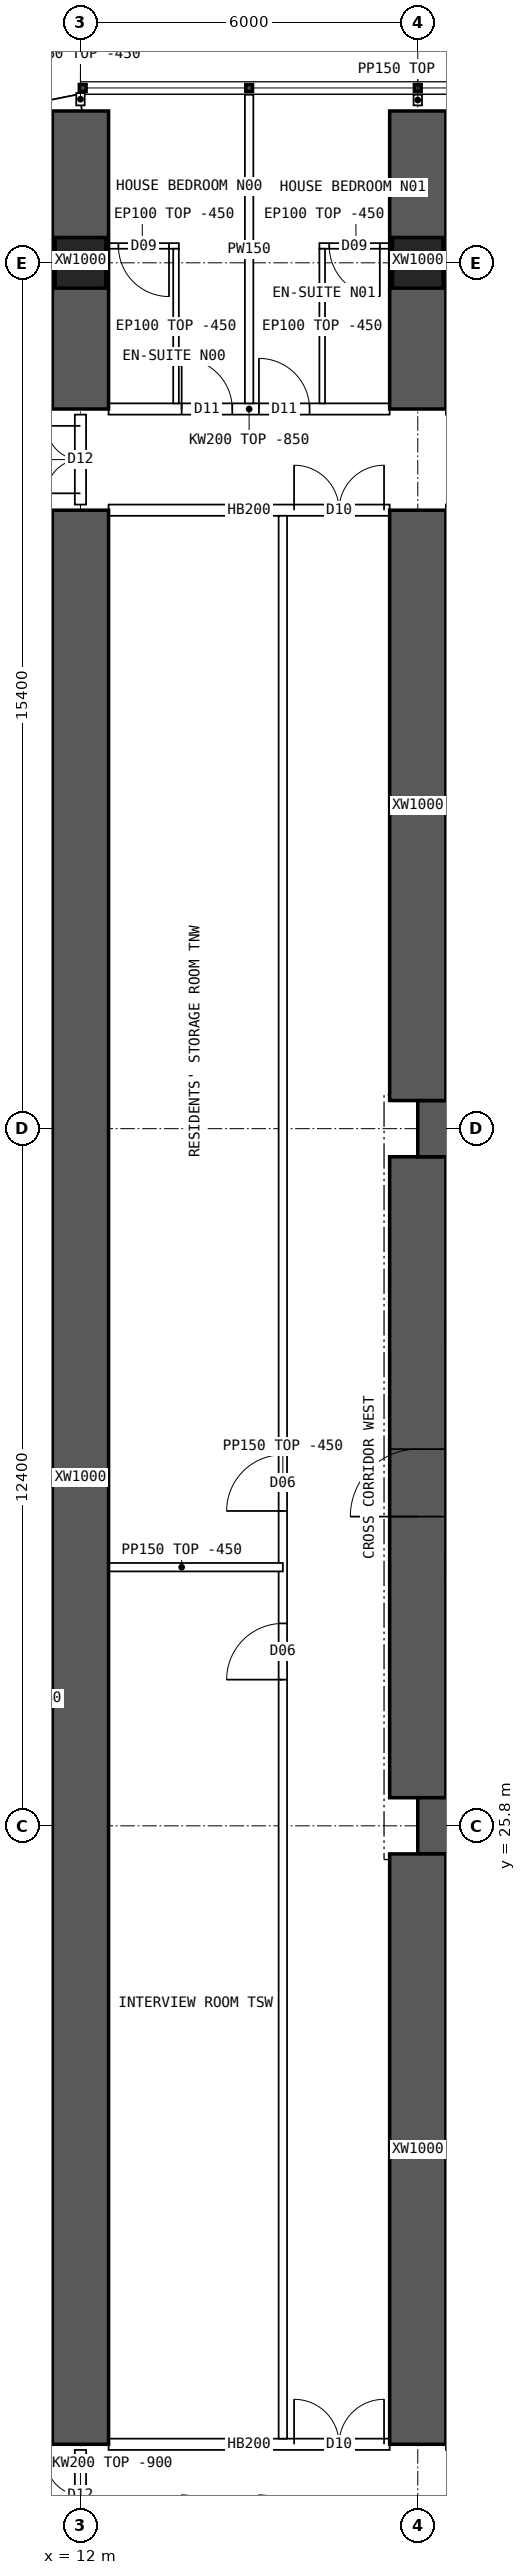
"""IFC4 building model, lengths in metres.
Left out: names, types, materials, properties, quantities, classifications, styles, units other than length and angle.
Written with IfcOpenShell. Run it as: python <this file> out.ifc"""

import sys

from ifc_helpers import new_model, si_unit, direction, frame, frame_2d, origin, origin_2d, place, context, subcontext, project, spatial, polyline, rectangle, hollow_rectangle, outline, extrude, element, fill, save


model = new_model("IFC4")
c1 = context("Model", 3, precision=1e-05, world=origin(), true_north=direction((0.0, 1.0)))
c2 = subcontext(c1, "Body", "Model", "MODEL_VIEW")
j1 = project(units=[si_unit("LENGTHUNIT", "METRE"), si_unit("PLANEANGLEUNIT", "RADIAN")], contexts=[c1])
p1 = place(None, origin())
s1 = spatial("IfcSite", under=j1, at=p1, CompositionType="ELEMENT")
p2 = place(p1, origin())
s2 = spatial("IfcBuilding", under=s1, at=p2, CompositionType="ELEMENT")
p3 = place(p2, frame((0.0, 0.0, 50.2)))
s3 = spatial("IfcBuildingStorey", under=s2, at=p3, CompositionType="ELEMENT", Elevation=50.2)
for number, where, z_axis, x_axis in (
    (1, (12.0, 53.6, 0.0), (0.0, 0.0, 1.0), (1.0, 0.0, 0.0)),
    (2, (18.0, 53.6, 0.0), (0.0, 0.0, 1.0), (1.0, 0.0, 0.0)),
):
    element("IfcColumn", number, at=place(p3, frame(where, z_axis=z_axis, x_axis=x_axis)), inside=s3, PredefinedType="COLUMN", context=c2, shape_type="SweptSolid", body=[
        extrude(hollow_rectangle(XDim=0.9, YDim=0.9, WallThickness=0.09, at=origin_2d()), origin(), (0.0, 0.0, 1.0), 3.75),
    ])
for number, where, z_axis, x_axis in (
    (3, (18.0, 25.8, 0.0), (0.0, 0.0, 1.0), (1.0, 0.0, 0.0)),
    (4, (18.0, 38.2, 0.0), (0.0, 0.0, 1.0), (1.0, 0.0, 0.0)),
):
    element("IfcWall", number, at=place(p3, frame(where, z_axis=z_axis, x_axis=x_axis)), inside=s3, PredefinedType="SHEAR", context=c2, shape_type="SweptSolid", body=[
        extrude(rectangle(XDim=48.0, YDim=1.0, at=frame_2d((24.0, 0.0))), origin(), (0.0, 0.0, 1.0), 3.75),
    ])
p4 = place(p3, frame((18.0, 26.3, 0.0), z_axis=(0.0, 0.0, 1.0), x_axis=(0.0, 1.0, 0.0)))
e5 = element("IfcWall", 5, at=p4, inside=s3, PredefinedType="SHEAR", context=c2, shape_type="SweptSolid", body=[
    extrude(rectangle(XDim=11.4, YDim=1.0, at=frame_2d((5.7, 0.0))), origin(), (0.0, 0.0, 1.0), 3.75),
])
p5 = place(p4, frame((5.0, 0.0, 0.0)))
e6 = element("IfcOpeningElement", 6, at=p5, cuts=e5, PredefinedType="OPENING", context=c2, shape_type="SweptSolid", body=[
    extrude(rectangle(XDim=1.2, YDim=2.1, at=frame_2d((0.6, 1.05))), frame((0.0, 0.51, 0.0), z_axis=(0.0, -1.0, 0.0), x_axis=(1.0, 0.0, 0.0)), (0.0, 0.0, 1.0), 1.02),
])
p6 = place(p3, frame((12.0, 51.0, 0.0), z_axis=(0.0, 0.0, 1.0), x_axis=(0.0, 1.0, 0.0)))
e7 = element("IfcWall", 7, at=p6, inside=s3, PredefinedType="SHEAR", context=c2, shape_type="SweptSolid", body=[
    extrude(rectangle(XDim=5.3, YDim=1.0, at=frame_2d((2.65, 0.0))), origin(), (0.0, 0.0, 1.0), 3.75),
])
p7 = place(p3, frame((12.0, 14.8, 0.0), z_axis=(0.0, 0.0, 1.0), x_axis=(0.0, 1.0, 0.0)))
e8 = element("IfcWall", 8, at=p7, inside=s3, PredefinedType="SHEAR", context=c2, shape_type="SweptSolid", body=[
    extrude(rectangle(XDim=34.4, YDim=1.0, at=frame_2d((17.2, 0.0))), origin(), (0.0, 0.0, 1.0), 3.75),
])
p8 = place(p3, frame((18.0, 51.0, 0.0), z_axis=(0.0, 0.0, 1.0), x_axis=(0.0, 1.0, 0.0)))
e9 = element("IfcWall", 9, at=p8, inside=s3, PredefinedType="SHEAR", context=c2, shape_type="SweptSolid", body=[
    extrude(rectangle(XDim=5.3, YDim=1.0, at=frame_2d((2.65, 0.0))), origin(), (0.0, 0.0, 1.0), 3.75),
])
for number, where, z_axis, x_axis in (
    (10, (18.0, 14.8, 0.0), (0.0, 0.0, 1.0), (0.0, 1.0, 0.0)),
    (11, (18.0, 38.7, 0.0), (0.0, 0.0, 1.0), (0.0, 1.0, 0.0)),
):
    element("IfcWall", number, at=place(p3, frame(where, z_axis=z_axis, x_axis=x_axis)), inside=s3, PredefinedType="SHEAR", context=c2, shape_type="SweptSolid", body=[
        extrude(rectangle(XDim=10.5, YDim=1.0, at=frame_2d((5.25, 0.0))), origin(), (0.0, 0.0, 1.0), 3.75),
    ])
p9 = place(p3, frame((12.0, 56.45, 0.0), z_axis=(0.0, 0.0, 1.0), x_axis=(-0.980787251524, -0.195080412259, 0.0)))
e12 = element("IfcWall", 12, at=p9, inside=s3, PredefinedType="SOLIDWALL", context=c2, shape_type="SweptSolid", body=[
    extrude(outline(polyline([(-0.03, -0.15), (3.249, -0.15), (3.189, 0.15), (0.03, 0.15), (-0.03, -0.15)])), origin(), (0.0, 0.0, 1.0), 3.3),
])
p10 = place(p9, frame((0.909, 0.0, 0.9)))
e13 = element("IfcOpeningElement", 13, at=p10, cuts=e12, PredefinedType="OPENING", context=c2, shape_type="SweptSolid", body=[
    extrude(rectangle(XDim=1.4, YDim=1.8, at=frame_2d((0.7, 0.9))), frame((0.0, 0.16, 0.0), z_axis=(0.0, -1.0, 0.0), x_axis=(1.0, 0.0, 0.0)), (0.0, 0.0, 1.0), 0.32),
])
p11 = place(p3, frame((12.5, 14.8, 0.0), z_axis=(0.0, 0.0, 1.0), x_axis=(1.0, 0.0, 0.0)))
e14 = element("IfcWall", 14, at=p11, inside=s3, PredefinedType="SOLIDWALL", context=c2, shape_type="SweptSolid", body=[
    extrude(rectangle(XDim=5.0, YDim=0.2, at=frame_2d((2.5, 0.0))), origin(), (0.0, 0.0, 1.0), 3.3),
])
p12 = place(p11, frame((3.3, 0.0, 0.0)))
e15 = element("IfcOpeningElement", 15, at=p12, cuts=e14, PredefinedType="OPENING", context=c2, shape_type="SweptSolid", body=[
    extrude(rectangle(XDim=1.6, YDim=2.1, at=frame_2d((0.8, 1.05))), frame((0.0, 0.11, 0.0), z_axis=(0.0, -1.0, 0.0), x_axis=(1.0, 0.0, 0.0)), (0.0, 0.0, 1.0), 0.22),
])
p13 = place(p3, frame((12.5, 51.0, 0.0), z_axis=(0.0, 0.0, 1.0), x_axis=(1.0, 0.0, 0.0)))
e16 = element("IfcWall", 16, at=p13, inside=s3, PredefinedType="SOLIDWALL", context=c2, shape_type="SweptSolid", body=[
    extrude(outline(polyline([(0.0, 0.0), (5.0, 0.0), (5.0, 2.9), (0.0, 2.9), (0.0, 0.0)])), frame((0.0, 0.1, 0.0), z_axis=(0.0, -1.0, 0.0), x_axis=(1.0, 0.0, 0.0)), (0.0, 0.0, 1.0), 0.2),
])
p14 = place(p13, frame((1.3, 0.0, 0.0)))
e17 = element("IfcOpeningElement", 17, at=p14, cuts=e16, PredefinedType="OPENING", context=c2, shape_type="SweptSolid", body=[
    extrude(rectangle(XDim=0.9, YDim=2.1, at=frame_2d((0.45, 1.05))), frame((0.0, 0.11, 0.0), z_axis=(0.0, -1.0, 0.0), x_axis=(1.0, 0.0, 0.0)), (0.0, 0.0, 1.0), 0.22),
])
p15 = place(p13, frame((2.675, 0.0, 0.0)))
e18 = element("IfcOpeningElement", 18, at=p15, cuts=e16, PredefinedType="OPENING", context=c2, shape_type="SweptSolid", body=[
    extrude(rectangle(XDim=0.9, YDim=2.1, at=frame_2d((0.45, 1.05))), frame((0.0, 0.11, 0.0), z_axis=(0.0, -1.0, 0.0), x_axis=(1.0, 0.0, 0.0)), (0.0, 0.0, 1.0), 0.22),
])
p16 = place(p3, frame((12.5, 49.2, 0.0), z_axis=(0.0, 0.0, 1.0), x_axis=(1.0, 0.0, 0.0)))
e19 = element("IfcWall", 19, at=p16, inside=s3, PredefinedType="SOLIDWALL", context=c2, shape_type="SweptSolid", body=[
    extrude(rectangle(XDim=5.0, YDim=0.2, at=frame_2d((2.5, 0.0))), origin(), (0.0, 0.0, 1.0), 3.3),
])
p17 = place(p16, frame((3.3, 0.0, 0.0)))
e20 = element("IfcOpeningElement", 20, at=p17, cuts=e19, PredefinedType="OPENING", context=c2, shape_type="SweptSolid", body=[
    extrude(rectangle(XDim=1.6, YDim=2.1, at=frame_2d((0.8, 1.05))), frame((0.0, 0.11, 0.0), z_axis=(0.0, -1.0, 0.0), x_axis=(1.0, 0.0, 0.0)), (0.0, 0.0, 1.0), 0.22),
])
p18 = place(p3, frame((15.0, 56.59, 0.0), z_axis=(0.0, 0.0, 1.0), x_axis=(0.0, -1.0, 0.0)))
e21 = element("IfcWall", 21, at=p18, inside=s3, PredefinedType="PARTITIONING", context=c2, shape_type="SweptSolid", body=[
    extrude(outline(polyline([(0.0, 0.0), (5.49, 0.0), (5.49, 2.9), (5.442, 2.9), (5.44, 3.3), (3.192, 3.3), (3.19, 2.9), (2.792, 2.9), (2.79, 3.3), (0.0, 3.3), (0.0, 0.0)])), frame((0.0, 0.075, 0.0), z_axis=(0.0, -1.0, 0.0), x_axis=(1.0, 0.0, 0.0)), (0.0, 0.0, 1.0), 0.15),
])
p19 = place(p3, frame((12.45, 53.9, 0.0), z_axis=(0.0, 0.0, 1.0), x_axis=(1.0, 0.0, 0.0)))
e22 = element("IfcWall", 22, at=p19, inside=s3, PredefinedType="PARTITIONING", context=c2, shape_type="SweptSolid", body=[
    extrude(rectangle(XDim=1.3, YDim=0.1, at=frame_2d((0.65, 0.0))), origin(), (0.0, 0.0, 1.0), 3.3),
])
p20 = place(p19, frame((0.225, 0.0, 0.0)))
e23 = element("IfcOpeningElement", 23, at=p20, cuts=e22, PredefinedType="OPENING", context=c2, shape_type="SweptSolid", body=[
    extrude(rectangle(XDim=0.9, YDim=2.1, at=frame_2d((0.45, 1.05))), frame((0.0, 0.06, 0.0), z_axis=(0.0, -1.0, 0.0), x_axis=(1.0, 0.0, 0.0)), (0.0, 0.0, 1.0), 0.12),
])
p21 = place(p3, frame((13.7, 53.85, 0.0), z_axis=(0.0, 0.0, 1.0), x_axis=(0.0, -1.0, 0.0)))
e24 = element("IfcWall", 24, at=p21, inside=s3, PredefinedType="PARTITIONING", context=c2, shape_type="SweptSolid", body=[
    extrude(outline(polyline([(0.0, 0.0), (2.75, 0.0), (2.75, 2.9), (2.702, 2.9), (2.7, 3.3), (0.452, 3.3), (0.45, 2.9), (0.0, 2.9), (0.0, 0.0)])), frame((0.0, 0.05, 0.0), z_axis=(0.0, -1.0, 0.0), x_axis=(1.0, 0.0, 0.0)), (0.0, 0.0, 1.0), 0.1),
])
p22 = place(p3, frame((16.25, 53.9, 0.0), z_axis=(0.0, 0.0, 1.0), x_axis=(1.0, 0.0, 0.0)))
e25 = element("IfcWall", 25, at=p22, inside=s3, PredefinedType="PARTITIONING", context=c2, shape_type="SweptSolid", body=[
    extrude(rectangle(XDim=1.3, YDim=0.1, at=frame_2d((0.65, 0.0))), origin(), (0.0, 0.0, 1.0), 3.3),
])
p23 = place(p22, frame((0.175, 0.0, 0.0)))
e26 = element("IfcOpeningElement", 26, at=p23, cuts=e25, PredefinedType="OPENING", context=c2, shape_type="SweptSolid", body=[
    extrude(rectangle(XDim=0.9, YDim=2.1, at=frame_2d((0.45, 1.05))), frame((0.0, 0.06, 0.0), z_axis=(0.0, -1.0, 0.0), x_axis=(1.0, 0.0, 0.0)), (0.0, 0.0, 1.0), 0.12),
])
p24 = place(p3, frame((16.3, 53.85, 0.0), z_axis=(0.0, 0.0, 1.0), x_axis=(0.0, -1.0, 0.0)))
e27 = element("IfcWall", 27, at=p24, inside=s3, PredefinedType="PARTITIONING", context=c2, shape_type="SweptSolid", body=[
    extrude(outline(polyline([(0.0, 0.0), (2.75, 0.0), (2.75, 2.9), (2.702, 2.9), (2.7, 3.3), (0.452, 3.3), (0.45, 2.9), (0.0, 2.9), (0.0, 0.0)])), frame((0.0, 0.05, 0.0), z_axis=(0.0, -1.0, 0.0), x_axis=(1.0, 0.0, 0.0)), (0.0, 0.0, 1.0), 0.1),
])
p25 = place(p3, frame((15.6, 14.9, 0.0), z_axis=(0.0, 0.0, 1.0), x_axis=(0.0, 1.0, 0.0)))
e28 = element("IfcWall", 28, at=p25, inside=s3, PredefinedType="PARTITIONING", context=c2, shape_type="SweptSolid", body=[
    extrude(rectangle(XDim=34.2, YDim=0.15, at=frame_2d((17.1, 0.0))), origin(), (0.0, 0.0, 1.0), 3.3),
])
p26 = place(p25, frame((13.5, 0.0, 0.0)))
e29 = element("IfcOpeningElement", 29, at=p26, cuts=e28, PredefinedType="OPENING", context=c2, shape_type="SweptSolid", body=[
    extrude(rectangle(XDim=1.0, YDim=2.1, at=frame_2d((0.5, 1.05))), frame((0.0, 0.085, 0.0), z_axis=(0.0, -1.0, 0.0), x_axis=(1.0, 0.0, 0.0)), (0.0, 0.0, 1.0), 0.17),
])
p27 = place(p25, frame((16.5, 0.0, 0.0)))
e30 = element("IfcOpeningElement", 30, at=p27, cuts=e28, PredefinedType="OPENING", context=c2, shape_type="SweptSolid", body=[
    extrude(rectangle(XDim=1.0, YDim=2.1, at=frame_2d((0.5, 1.05))), frame((0.0, 0.085, 0.0), z_axis=(0.0, -1.0, 0.0), x_axis=(1.0, 0.0, 0.0)), (0.0, 0.0, 1.0), 0.17),
])
p28 = place(p3, frame((12.0, 30.4, 0.0), z_axis=(0.0, 0.0, 1.0), x_axis=(1.0, 0.0, 0.0)))
e31 = element("IfcWall", 31, at=p28, inside=s3, PredefinedType="PARTITIONING", context=c2, shape_type="SweptSolid", body=[
    extrude(rectangle(XDim=3.6, YDim=0.15, at=frame_2d((1.8, 0.0))), origin(), (0.0, 0.0, 1.0), 3.3),
])
p29 = place(p3, frame((3.905, 30.85, 0.0), z_axis=(0.0, 0.0, 1.0), x_axis=(1.0, 0.0, 0.0)))
e32 = element("IfcWall", 32, at=p29, inside=s3, PredefinedType="PARTITIONING", context=c2, shape_type="SweptSolid", body=[
    extrude(outline(polyline([(0.0, 0.0), (8.02, 0.0), (8.02, 3.3), (2.397, 3.3), (2.395, 2.85), (1.797, 2.85), (1.795, 3.3), (0.0, 3.3), (0.0, 0.0)])), frame((0.0, 0.075, 0.0), z_axis=(0.0, -1.0, 0.0), x_axis=(1.0, 0.0, 0.0)), (0.0, 0.0, 1.0), 0.15),
])
p30 = place(p3, frame((12.0, 13.1, 0.0), z_axis=(0.0, 0.0, 1.0), x_axis=(0.0, 1.0, 0.0)))
e33 = element("IfcWall", 33, at=p30, inside=s3, PredefinedType="SOLIDWALL", context=c2, shape_type="SweptSolid", body=[
    extrude(outline(polyline([(0.0, 0.0), (1.6, 0.0), (1.6, 2.85), (0.0, 2.85), (0.0, 0.0)])), frame((0.0, 0.1, 0.0), z_axis=(0.0, -1.0, 0.0), x_axis=(1.0, 0.0, 0.0)), (0.0, 0.0, 1.0), 0.2),
])
p31 = place(p30, frame((0.2, 0.0, 0.0)))
e34 = element("IfcOpeningElement", 34, at=p31, cuts=e33, PredefinedType="OPENING", context=c2, shape_type="SweptSolid", body=[
    extrude(rectangle(XDim=1.2, YDim=2.1, at=frame_2d((0.6, 1.05))), frame((0.0, 0.11, 0.0), z_axis=(0.0, -1.0, 0.0), x_axis=(1.0, 0.0, 0.0)), (0.0, 0.0, 1.0), 0.22),
])
p32 = place(p3, frame((12.0, 49.3, 0.0), z_axis=(0.0, 0.0, 1.0), x_axis=(0.0, 1.0, 0.0)))
e35 = element("IfcWall", 35, at=p32, inside=s3, PredefinedType="SOLIDWALL", context=c2, shape_type="SweptSolid", body=[
    extrude(outline(polyline([(0.0, 0.0), (1.6, 0.0), (1.6, 2.85), (0.0, 2.85), (0.0, 0.0)])), frame((0.0, 0.1, 0.0), z_axis=(0.0, -1.0, 0.0), x_axis=(1.0, 0.0, 0.0)), (0.0, 0.0, 1.0), 0.2),
])
p33 = place(p32, frame((0.2, 0.0, 0.0)))
e36 = element("IfcOpeningElement", 36, at=p33, cuts=e35, PredefinedType="OPENING", context=c2, shape_type="SweptSolid", body=[
    extrude(rectangle(XDim=1.2, YDim=2.1, at=frame_2d((0.6, 1.05))), frame((0.0, 0.11, 0.0), z_axis=(0.0, -1.0, 0.0), x_axis=(1.0, 0.0, 0.0)), (0.0, 0.0, 1.0), 0.22),
])
p34 = place(p3, frame((12.0, 56.4, 0.0), z_axis=(0.0, 0.0, 1.0), x_axis=(0.0, 1.0, 0.0)))
e37 = element("IfcWall", 37, at=p34, inside=s3, PredefinedType="PARTITIONING", context=c2, shape_type="SweptSolid", body=[
    extrude(rectangle(XDim=0.22, YDim=0.15, at=frame_2d((0.11, 0.0))), origin(), (0.0, 0.0, 1.0), 3.3),
])
p35 = place(p3, frame((18.0, 56.4, 0.0), z_axis=(0.0, 0.0, 1.0), x_axis=(0.0, 1.0, 0.0)))
e38 = element("IfcWall", 38, at=p35, inside=s3, PredefinedType="PARTITIONING", context=c2, shape_type="SweptSolid", body=[
    extrude(rectangle(XDim=0.19, YDim=0.15, at=frame_2d((0.095, 0.0))), origin(), (0.0, 0.0, 1.0), 3.3),
])
p36 = place(p5, origin())
e39 = element("IfcDoor", 39, at=p36, inside=s3, OperationType="SINGLE_SWING_LEFT", PredefinedType="DOOR", context=c2, shape_type="SweptSolid", body=[
    extrude(rectangle(XDim=1.2, YDim=2.1, at=frame_2d((0.6, 1.05))), frame((0.0, 0.025, 0.0), z_axis=(0.0, -1.0, 0.0), x_axis=(1.0, 0.0, 0.0)), (0.0, 0.0, 1.0), 0.05),
])
fill(e6, e39)
p37 = place(p12, origin())
e40 = element("IfcDoor", 40, at=p37, inside=s3, OperationType="DOUBLE_DOOR_SINGLE_SWING", PredefinedType="DOOR", context=c2, shape_type="SweptSolid", body=[
    extrude(rectangle(XDim=1.6, YDim=2.1, at=frame_2d((0.8, 1.05))), frame((0.0, 0.025, 0.0), z_axis=(0.0, -1.0, 0.0), x_axis=(1.0, 0.0, 0.0)), (0.0, 0.0, 1.0), 0.05),
])
fill(e15, e40)
p38 = place(p17, origin())
e41 = element("IfcDoor", 41, at=p38, inside=s3, OperationType="DOUBLE_DOOR_SINGLE_SWING", PredefinedType="DOOR", context=c2, shape_type="SweptSolid", body=[
    extrude(rectangle(XDim=1.6, YDim=2.1, at=frame_2d((0.8, 1.05))), frame((0.0, 0.025, 0.0), z_axis=(0.0, -1.0, 0.0), x_axis=(1.0, 0.0, 0.0)), (0.0, 0.0, 1.0), 0.05),
])
fill(e20, e41)
p39 = place(p20, origin())
e42 = element("IfcDoor", 42, at=p39, inside=s3, OperationType="SINGLE_SWING_RIGHT", PredefinedType="DOOR", context=c2, shape_type="SweptSolid", body=[
    extrude(rectangle(XDim=0.9, YDim=2.1, at=frame_2d((0.45, 1.05))), frame((0.0, 0.025, 0.0), z_axis=(0.0, -1.0, 0.0), x_axis=(1.0, 0.0, 0.0)), (0.0, 0.0, 1.0), 0.05),
])
fill(e23, e42)
p40 = place(p14, origin())
e43 = element("IfcDoor", 43, at=p40, inside=s3, OperationType="SINGLE_SWING_LEFT", PredefinedType="DOOR", context=c2, shape_type="SweptSolid", body=[
    extrude(rectangle(XDim=0.9, YDim=2.1, at=frame_2d((0.45, 1.05))), frame((0.0, 0.025, 0.0), z_axis=(0.0, -1.0, 0.0), x_axis=(1.0, 0.0, 0.0)), (0.0, 0.0, 1.0), 0.05),
])
fill(e17, e43)
p41 = place(p23, origin())
e44 = element("IfcDoor", 44, at=p41, inside=s3, OperationType="SINGLE_SWING_RIGHT", PredefinedType="DOOR", context=c2, shape_type="SweptSolid", body=[
    extrude(rectangle(XDim=0.9, YDim=2.1, at=frame_2d((0.45, 1.05))), frame((0.0, 0.025, 0.0), z_axis=(0.0, -1.0, 0.0), x_axis=(1.0, 0.0, 0.0)), (0.0, 0.0, 1.0), 0.05),
])
fill(e26, e44)
p42 = place(p15, origin())
e45 = element("IfcDoor", 45, at=p42, inside=s3, OperationType="SINGLE_SWING_LEFT", PredefinedType="DOOR", context=c2, shape_type="SweptSolid", body=[
    extrude(rectangle(XDim=0.9, YDim=2.1, at=frame_2d((0.45, 1.05))), frame((0.0, 0.025, 0.0), z_axis=(0.0, -1.0, 0.0), x_axis=(1.0, 0.0, 0.0)), (0.0, 0.0, 1.0), 0.05),
])
fill(e18, e45)
p43 = place(p26, origin())
e46 = element("IfcDoor", 46, at=p43, inside=s3, OperationType="SINGLE_SWING_LEFT", PredefinedType="DOOR", context=c2, shape_type="SweptSolid", body=[
    extrude(rectangle(XDim=1.0, YDim=2.1, at=frame_2d((0.5, 1.05))), frame((0.0, 0.025, 0.0), z_axis=(0.0, -1.0, 0.0), x_axis=(1.0, 0.0, 0.0)), (0.0, 0.0, 1.0), 0.05),
])
fill(e29, e46)
p44 = place(p27, origin())
e47 = element("IfcDoor", 47, at=p44, inside=s3, OperationType="SINGLE_SWING_LEFT", PredefinedType="DOOR", context=c2, shape_type="SweptSolid", body=[
    extrude(rectangle(XDim=1.0, YDim=2.1, at=frame_2d((0.5, 1.05))), frame((0.0, 0.025, 0.0), z_axis=(0.0, -1.0, 0.0), x_axis=(1.0, 0.0, 0.0)), (0.0, 0.0, 1.0), 0.05),
])
fill(e30, e47)
p45 = place(p31, origin())
e48 = element("IfcDoor", 48, at=p45, inside=s3, OperationType="DOUBLE_DOOR_SINGLE_SWING", PredefinedType="DOOR", context=c2, shape_type="SweptSolid", body=[
    extrude(rectangle(XDim=1.2, YDim=2.1, at=frame_2d((0.6, 1.05))), frame((0.0, 0.025, 0.0), z_axis=(0.0, -1.0, 0.0), x_axis=(1.0, 0.0, 0.0)), (0.0, 0.0, 1.0), 0.05),
])
fill(e34, e48)
p46 = place(p33, origin())
e49 = element("IfcDoor", 49, at=p46, inside=s3, OperationType="DOUBLE_DOOR_SINGLE_SWING", PredefinedType="DOOR", context=c2, shape_type="SweptSolid", body=[
    extrude(rectangle(XDim=1.2, YDim=2.1, at=frame_2d((0.6, 1.05))), frame((0.0, 0.025, 0.0), z_axis=(0.0, -1.0, 0.0), x_axis=(1.0, 0.0, 0.0)), (0.0, 0.0, 1.0), 0.05),
])
fill(e36, e49)
save(model, sys.argv[1])
